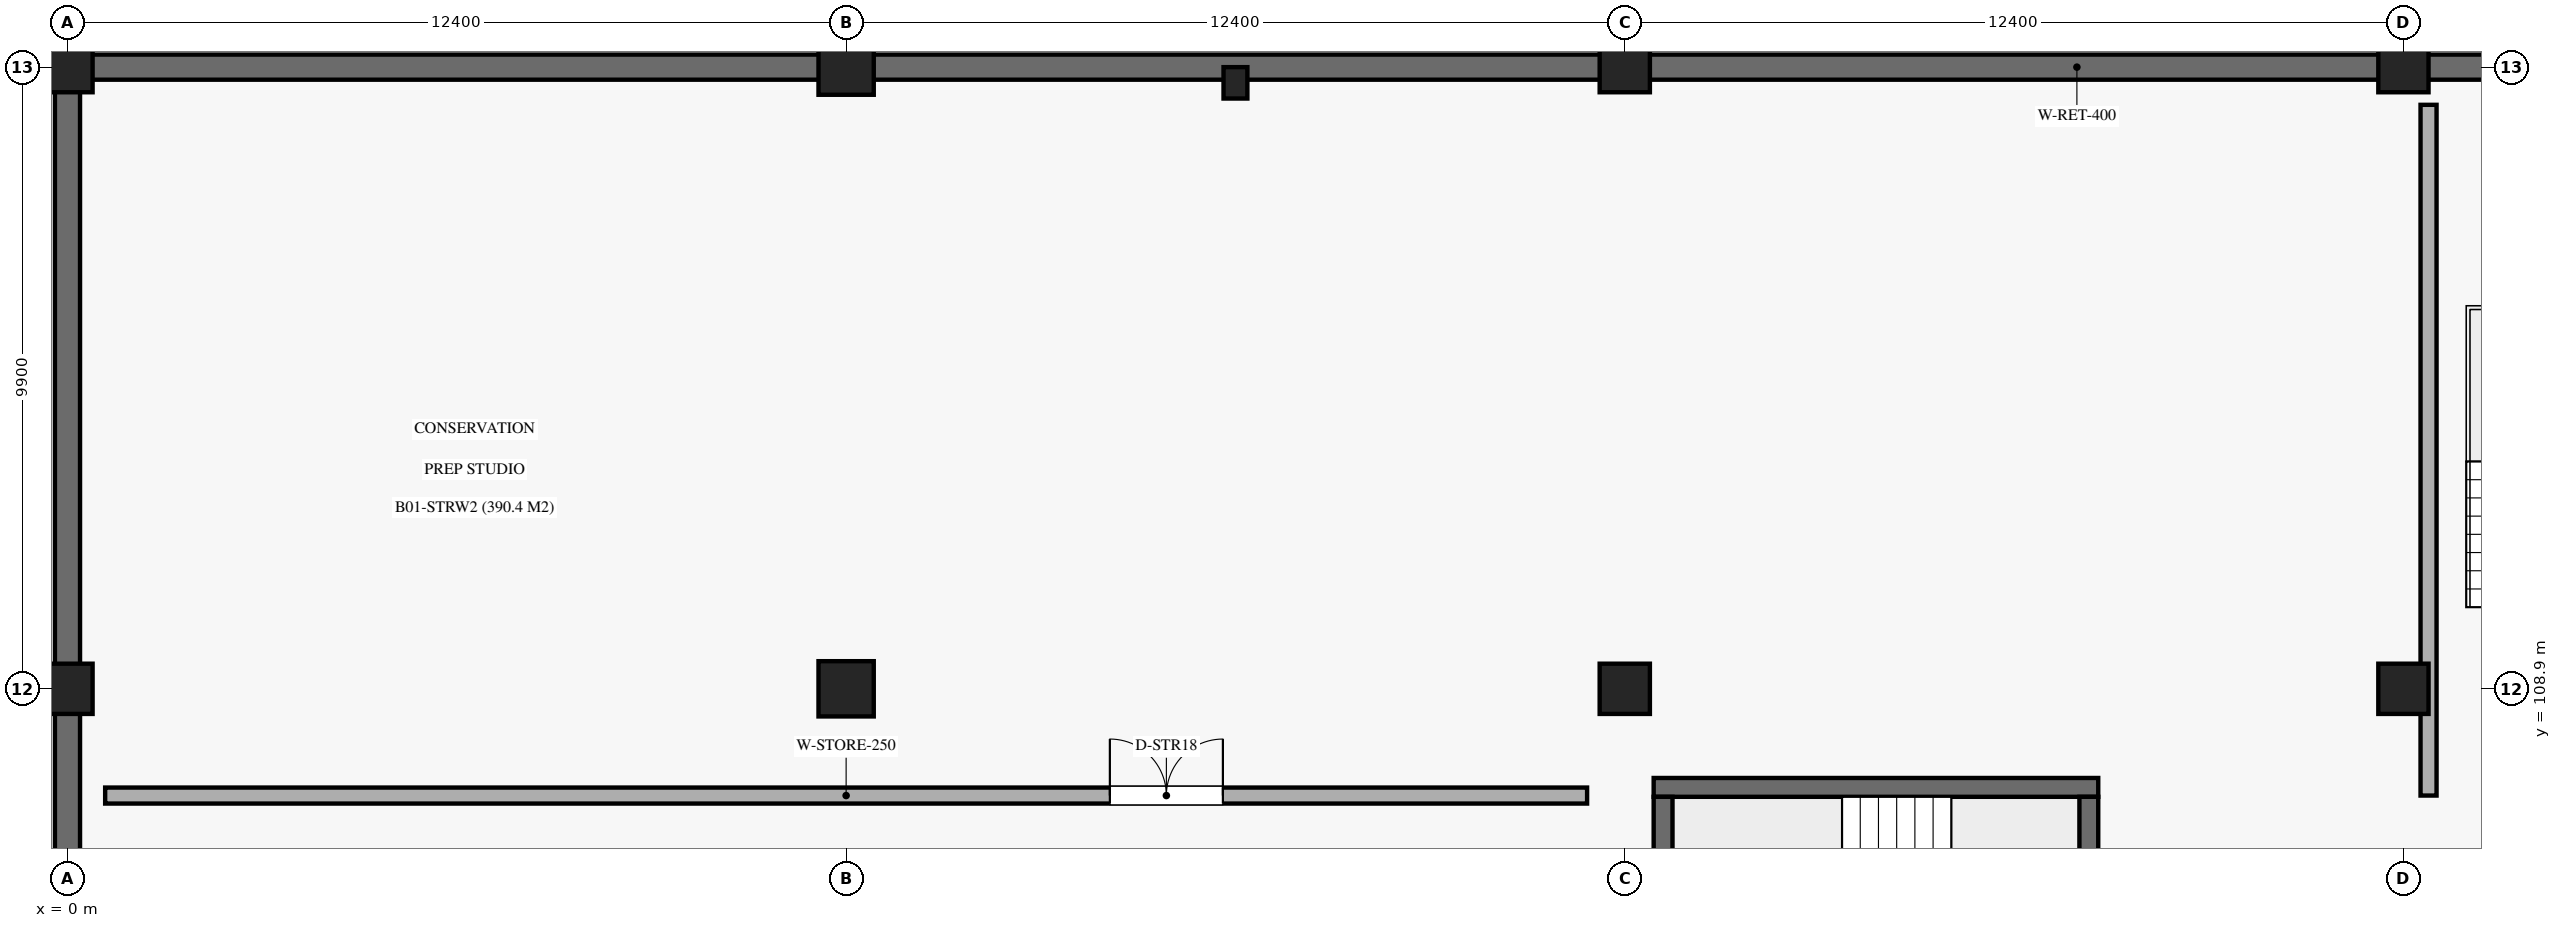
"""IFC4 building model, lengths in metres.
Left out: names, types, materials, properties, quantities, classifications, styles, units other than length and angle.
Written with IfcOpenShell. Run it as: python <this file> out.ifc"""

import sys

from ifc_helpers import new_model, si_unit, direction, frame, frame_2d, origin, origin_2d, place, context, subcontext, project, spatial, rectangle, circle, extrude, element, fill, save


model = new_model("IFC4")
c1 = context("Model", 3, precision=1e-05, world=origin(), true_north=direction((0.0, 1.0)))
c2 = subcontext(c1, "Body", "Model", "MODEL_VIEW")
j1 = project(units=[si_unit("LENGTHUNIT", "METRE"), si_unit("PLANEANGLEUNIT", "RADIAN")], contexts=[c1])
p1 = place(None, origin())
s1 = spatial("IfcSite", under=j1, at=p1, CompositionType="ELEMENT")
p2 = place(p1, origin())
s2 = spatial("IfcBuilding", under=s1, at=p2, CompositionType="ELEMENT")
p3 = place(p2, frame((0.0, 0.0, -4.59)))
s3 = spatial("IfcBuildingStorey", under=s2, at=p3, CompositionType="ELEMENT", Elevation=-4.59)
for number, where, z_axis, x_axis in (
    (1, (0.0, 108.9, 0.0), (0.0, 0.0, 1.0), (1.0, 0.0, 0.0)),
    (2, (0.0, 118.8, 0.0), (0.0, 0.0, 1.0), (1.0, 0.0, 0.0)),
):
    element("IfcColumn", number, at=place(p3, frame(where, z_axis=z_axis, x_axis=x_axis)), inside=s3, PredefinedType="COLUMN", context=c2, shape_type="SweptSolid", body=[
        extrude(rectangle(XDim=0.8, YDim=0.8, at=origin_2d()), origin(), (0.0, 0.0, 1.0), 4.59),
    ])
for number, where, z_axis, x_axis in (
    (3, (12.4, 108.9, 0.0), (0.0, 0.0, 1.0), (1.0, 0.0, 0.0)),
    (4, (12.4, 118.8, 0.0), (0.0, 0.0, 1.0), (1.0, 0.0, 0.0)),
):
    element("IfcColumn", number, at=place(p3, frame(where, z_axis=z_axis, x_axis=x_axis)), inside=s3, PredefinedType="COLUMN", context=c2, shape_type="SweptSolid", body=[
        extrude(circle(Radius=0.44, at=origin_2d()), origin(), (0.0, 0.0, 1.0), 4.59),
    ])
for number, where, z_axis, x_axis in (
    (5, (24.8, 108.9, 0.0), (0.0, 0.0, 1.0), (1.0, 0.0, 0.0)),
    (6, (24.8, 118.8, 0.0), (0.0, 0.0, 1.0), (1.0, 0.0, 0.0)),
    (7, (37.2, 108.9, 0.0), (0.0, 0.0, 1.0), (1.0, 0.0, 0.0)),
    (8, (37.2, 118.8, 0.0), (0.0, 0.0, 1.0), (1.0, 0.0, 0.0)),
):
    element("IfcColumn", number, at=place(p3, frame(where, z_axis=z_axis, x_axis=x_axis)), inside=s3, PredefinedType="COLUMN", context=c2, shape_type="SweptSolid", body=[
        extrude(rectangle(XDim=0.8, YDim=0.8, at=origin_2d()), origin(), (0.0, 0.0, 1.0), 4.59),
    ])
p4 = place(p3, frame((18.6, 118.55, 0.0), z_axis=(0.0, 0.0, 1.0), x_axis=(1.0, 0.0, 0.0)))
e9 = element("IfcColumn", 9, at=p4, inside=s3, PredefinedType="PILASTER", context=c2, shape_type="SweptSolid", body=[
    extrude(rectangle(XDim=0.38, YDim=0.5, at=origin_2d()), origin(), (0.0, 0.0, 1.0), 4.59),
])
p5 = place(p3, frame((114.4, 118.8, 0.0), z_axis=(0.0, 0.0, 1.0), x_axis=(-1.0, 0.0, 0.0)))
e10 = element("IfcWall", 10, at=p5, inside=s3, PredefinedType="USERDEFINED", context=c2, shape_type="SweptSolid", body=[
    extrude(rectangle(XDim=114.4, YDim=0.4, at=frame_2d((57.2, 0.0))), origin(), (0.0, 0.0, 1.0), 3.64),
])
p6 = place(p3, frame((0.0, 118.8, 0.0), z_axis=(0.0, 0.0, 1.0), x_axis=(0.0, -1.0, 0.0)))
e11 = element("IfcWall", 11, at=p6, inside=s3, PredefinedType="USERDEFINED", context=c2, shape_type="SweptSolid", body=[
    extrude(rectangle(XDim=39.6, YDim=0.4, at=frame_2d((19.8, 0.0))), origin(), (0.0, 0.0, 1.0), 3.64),
])
p7 = place(p3, frame((25.26, 107.33, 0.0), z_axis=(0.0, 0.0, 1.0), x_axis=(1.0, 0.0, 0.0)))
e12 = element("IfcWall", 12, at=p7, inside=s3, PredefinedType="SHEAR", context=c2, shape_type="SweptSolid", body=[
    extrude(rectangle(XDim=7.08, YDim=0.3, at=frame_2d((3.54, 0.0))), origin(), (0.0, 0.0, 1.0), 4.29),
])
for number, where, z_axis, x_axis in (
    (13, (25.41, 100.7, 0.0), (0.0, 0.0, 1.0), (0.0, 1.0, 0.0)),
    (14, (32.19, 100.7, 0.0), (0.0, 0.0, 1.0), (0.0, 1.0, 0.0)),
):
    element("IfcWall", number, at=place(p3, frame(where, z_axis=z_axis, x_axis=x_axis)), inside=s3, PredefinedType="SHEAR", context=c2, shape_type="SweptSolid", body=[
        extrude(rectangle(XDim=6.48, YDim=0.3, at=frame_2d((3.24, 0.0))), origin(), (0.0, 0.0, 1.0), 4.29),
    ])
p8 = place(p3, frame((0.6, 107.2, 0.0), z_axis=(0.0, 0.0, 1.0), x_axis=(1.0, 0.0, 0.0)))
e15 = element("IfcWall", 15, at=p8, inside=s3, PredefinedType="SOLIDWALL", context=c2, shape_type="SweptSolid", body=[
    extrude(rectangle(XDim=23.6, YDim=0.255, at=frame_2d((11.8, 0.0))), origin(), (0.0, 0.0, 1.0), 3.41),
])
p9 = place(p8, frame((16.0, 0.0, 0.0)))
e16 = element("IfcOpeningElement", 16, at=p9, cuts=e15, PredefinedType="OPENING", context=c2, shape_type="SweptSolid", body=[
    extrude(rectangle(XDim=1.8, YDim=2.35, at=frame_2d((0.9, 1.175))), frame((0.0, 0.137, 0.0), z_axis=(0.0, -1.0, 0.0), x_axis=(1.0, 0.0, 0.0)), (0.0, 0.0, 1.0), 0.275),
])
p10 = place(p3, frame((37.6, 107.2, 0.0), z_axis=(0.0, 0.0, 1.0), x_axis=(0.0, 1.0, 0.0)))
e17 = element("IfcWall", 17, at=p10, inside=s3, PredefinedType="SOLIDWALL", context=c2, shape_type="SweptSolid", body=[
    extrude(rectangle(XDim=11.0, YDim=0.255, at=frame_2d((5.5, 0.0))), origin(), (0.0, 0.0, 1.0), 3.41),
])
p11 = place(p9, origin())
e18 = element("IfcDoor", 18, at=p11, inside=s3, OperationType="DOUBLE_DOOR_SINGLE_SWING", PredefinedType="DOOR", context=c2, shape_type="SweptSolid", body=[
    extrude(rectangle(XDim=1.8, YDim=2.35, at=frame_2d((0.9, 1.175))), frame((0.0, 0.025, 0.0), z_axis=(0.0, -1.0, 0.0), x_axis=(1.0, 0.0, 0.0)), (0.0, 0.0, 1.0), 0.05),
])
fill(e16, e18)
save(model, sys.argv[1])
